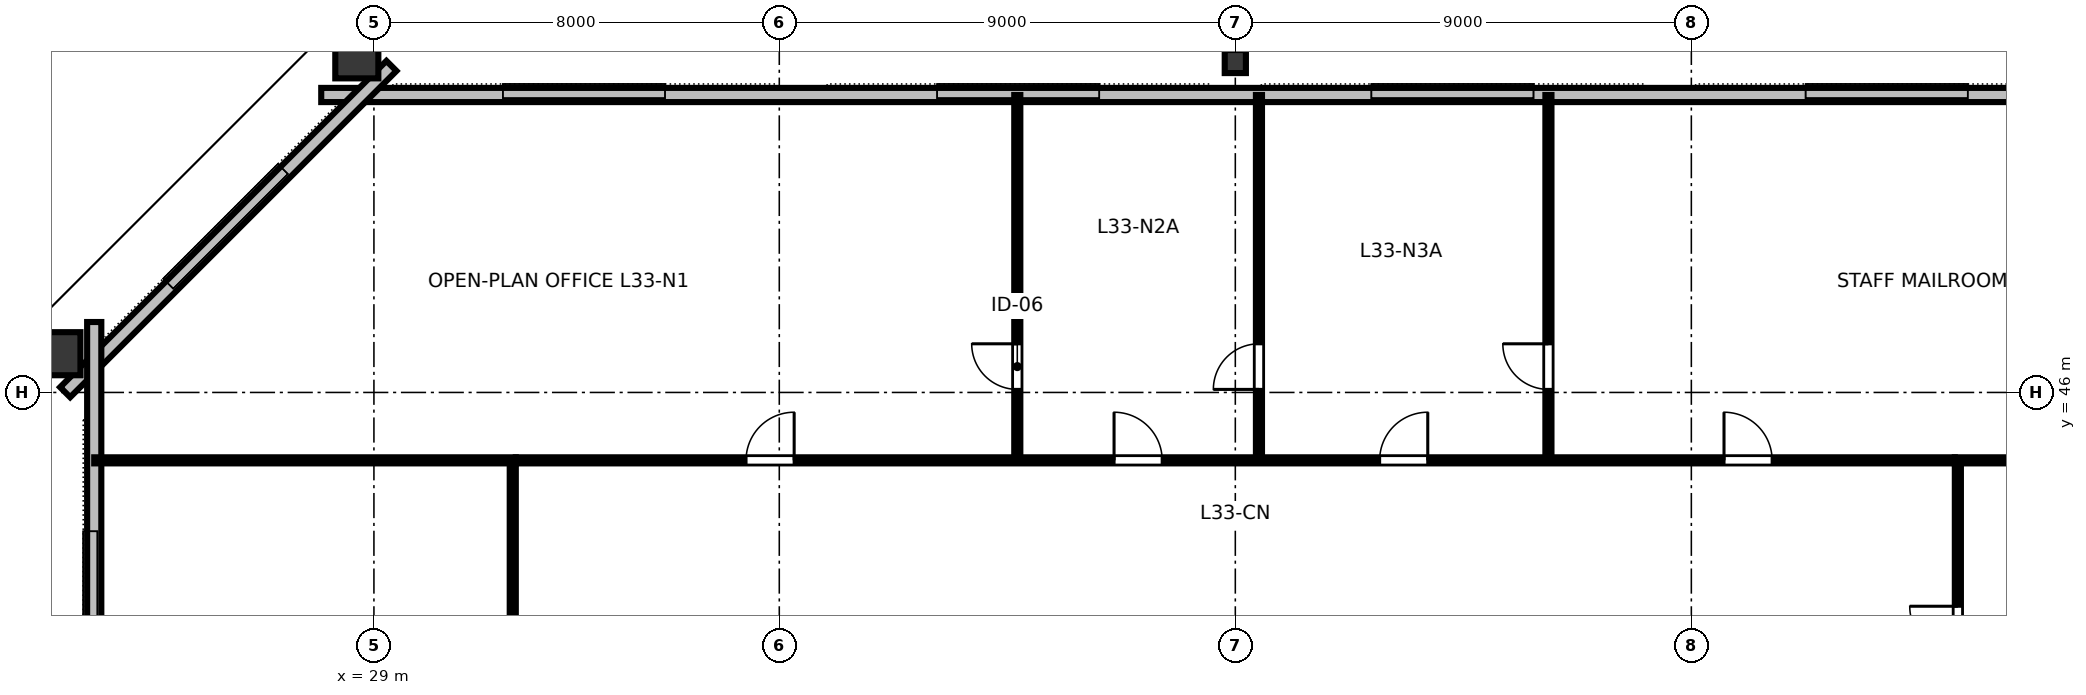
"""IFC4 building model, lengths in metres.
Left out: names, types, materials, properties, quantities, classifications, styles, units other than length and angle.
Written with IfcOpenShell. Run it as: python <this file> out.ifc"""

import sys

from ifc_helpers import new_model, si_unit, direction, frame, frame_2d, origin, origin_2d, place, context, subcontext, project, spatial, rectangle, hollow_rectangle, i_section, extrude, element, fill, save


model = new_model("IFC4")
c1 = context("Model", 3, precision=1e-05, world=origin(), true_north=direction((0.0, 1.0)))
c2 = subcontext(c1, "Body", "Model", "MODEL_VIEW")
j1 = project(units=[si_unit("LENGTHUNIT", "METRE"), si_unit("PLANEANGLEUNIT", "RADIAN")], contexts=[c1])
p1 = place(None, origin())
s1 = spatial("IfcSite", under=j1, at=p1, CompositionType="ELEMENT")
p2 = place(p1, origin())
s2 = spatial("IfcBuilding", under=s1, at=p2, CompositionType="ELEMENT")
p3 = place(p2, frame((0.0, 0.0, 127.6)))
s3 = spatial("IfcBuildingStorey", under=s2, at=p3, CompositionType="ELEMENT", Elevation=127.6)
p4 = place(p3, frame((46.0, 52.53, 0.0), z_axis=(0.0, 0.0, 1.0), x_axis=(1.0, 0.0, 0.0)))
e1 = element("IfcColumn", 1, at=p4, inside=s3, PredefinedType="COLUMN", context=c2, shape_type="SweptSolid", body=[
    extrude(i_section(OverallWidth=0.418, OverallDepth=0.455, WebThickness=0.042, FlangeThickness=0.068, FilletRadius=0.025, at=origin_2d()), origin(), (0.0, 0.0, 1.0), 3.358),
])
for number, where, z_axis, x_axis in (
    (2, (28.662, 52.698, 0.0), (0.0, 0.0, 1.0), (1.0, 0.0, 0.0)),
    (3, (22.708, 46.764, 0.0), (0.0, 0.0, 1.0), (0.0, 1.0, 0.0)),
):
    element("IfcColumn", number, at=place(p3, frame(where, z_axis=z_axis, x_axis=x_axis)), inside=s3, PredefinedType="COLUMN", context=c2, shape_type="SweptSolid", body=[
        extrude(hollow_rectangle(XDim=0.85, YDim=1.0, WallThickness=0.05, at=origin_2d()), origin(), (0.0, 0.0, 1.0), 3.358),
    ])
p5 = place(p3, frame((64.04, 51.87, 0.0), z_axis=(0.0, 0.0, 1.0), x_axis=(-1.0, 0.0, 0.0)))
e4 = element("IfcWall", 4, at=p5, inside=s3, PredefinedType="STANDARD", context=c2, shape_type="SweptSolid", body=[
    extrude(rectangle(XDim=36.08, YDim=0.28, at=frame_2d((18.04, 0.0))), origin(), (0.0, 0.0, 1.0), 3.36),
])
p6 = place(p3, frame((29.345, 52.444, 0.0), z_axis=(0.0, 0.0, 1.0), x_axis=(-0.707106781187, -0.707106781187, 0.0)))
e5 = element("IfcWall", 5, at=p6, inside=s3, PredefinedType="STANDARD", context=c2, shape_type="SweptSolid", body=[
    extrude(rectangle(XDim=9.107, YDim=0.28, at=frame_2d((4.553, 0.0))), origin(), (0.0, 0.0, 1.0), 3.36),
])
p7 = place(p3, frame((23.48, 47.39, 0.0), z_axis=(0.0, 0.0, 1.0), x_axis=(0.0, -1.0, 0.0)))
e6 = element("IfcWall", 6, at=p7, inside=s3, PredefinedType="STANDARD", context=c2, shape_type="SweptSolid", body=[
    extrude(rectangle(XDim=30.78, YDim=0.28, at=frame_2d((15.39, 0.0))), origin(), (0.0, 0.0, 1.0), 3.36),
])
p8 = place(p3, frame((41.697, 44.66, 0.0), z_axis=(0.0, 0.0, 1.0), x_axis=(0.0, 1.0, 0.0)))
e7 = element("IfcWall", 7, at=p8, inside=s3, PredefinedType="PARTITIONING", context=c2, shape_type="SweptSolid", body=[
    extrude(rectangle(XDim=7.21, YDim=0.12, at=frame_2d((3.605, 0.0))), origin(), (0.0, 0.0, 1.0), 2.64),
])
p9 = place(p8, frame((1.4, 0.0, 0.0)))
e8 = element("IfcOpeningElement", 8, at=p9, cuts=e7, PredefinedType="OPENING", context=c2, shape_type="SweptSolid", body=[
    extrude(rectangle(XDim=0.9, YDim=2.15, at=frame_2d((0.45, 1.075))), frame((0.0, 0.07, 0.0), z_axis=(0.0, -1.0, 0.0), x_axis=(1.0, 0.0, 0.0)), (0.0, 0.0, 1.0), 0.14),
])
p10 = place(p3, frame((46.467, 44.66, 0.0), z_axis=(0.0, 0.0, 1.0), x_axis=(0.0, 1.0, 0.0)))
e9 = element("IfcWall", 9, at=p10, inside=s3, PredefinedType="PARTITIONING", context=c2, shape_type="SweptSolid", body=[
    extrude(rectangle(XDim=7.21, YDim=0.12, at=frame_2d((3.605, 0.0))), origin(), (0.0, 0.0, 1.0), 2.64),
])
p11 = place(p10, frame((1.4, 0.0, 0.0)))
e10 = element("IfcOpeningElement", 10, at=p11, cuts=e9, PredefinedType="OPENING", context=c2, shape_type="SweptSolid", body=[
    extrude(rectangle(XDim=0.9, YDim=2.15, at=frame_2d((0.45, 1.075))), frame((0.0, 0.07, 0.0), z_axis=(0.0, -1.0, 0.0), x_axis=(1.0, 0.0, 0.0)), (0.0, 0.0, 1.0), 0.14),
])
p12 = place(p3, frame((52.179, 44.66, 0.0), z_axis=(0.0, 0.0, 1.0), x_axis=(0.0, 1.0, 0.0)))
e11 = element("IfcWall", 11, at=p12, inside=s3, PredefinedType="PARTITIONING", context=c2, shape_type="SweptSolid", body=[
    extrude(rectangle(XDim=7.21, YDim=0.12, at=frame_2d((3.605, 0.0))), origin(), (0.0, 0.0, 1.0), 2.64),
])
p13 = place(p12, frame((1.4, 0.0, 0.0)))
e12 = element("IfcOpeningElement", 12, at=p13, cuts=e11, PredefinedType="OPENING", context=c2, shape_type="SweptSolid", body=[
    extrude(rectangle(XDim=0.9, YDim=2.15, at=frame_2d((0.45, 1.075))), frame((0.0, 0.07, 0.0), z_axis=(0.0, -1.0, 0.0), x_axis=(1.0, 0.0, 0.0)), (0.0, 0.0, 1.0), 0.14),
])
p14 = place(p3, frame((31.8, 44.66, 0.0), z_axis=(0.0, 0.0, 1.0), x_axis=(1.0, 0.0, 0.0)))
e13 = element("IfcWall", 13, at=p14, inside=s3, PredefinedType="PARTITIONING", context=c2, shape_type="SweptSolid", body=[
    extrude(rectangle(XDim=28.4, YDim=0.12, at=frame_2d((14.2, 0.0))), origin(), (0.0, 0.0, 1.0), 2.64),
])
p15 = place(p14, frame((4.544, 0.0, 0.0)))
e14 = element("IfcOpeningElement", 14, at=p15, cuts=e13, PredefinedType="OPENING", context=c2, shape_type="SweptSolid", body=[
    extrude(rectangle(XDim=0.95, YDim=2.15, at=frame_2d((0.475, 1.075))), frame((0.0, 0.07, 0.0), z_axis=(0.0, -1.0, 0.0), x_axis=(1.0, 0.0, 0.0)), (0.0, 0.0, 1.0), 0.14),
])
p16 = place(p14, frame((11.807, 0.0, 0.0)))
e15 = element("IfcOpeningElement", 15, at=p16, cuts=e13, PredefinedType="OPENING", context=c2, shape_type="SweptSolid", body=[
    extrude(rectangle(XDim=0.95, YDim=2.15, at=frame_2d((0.475, 1.075))), frame((0.0, 0.07, 0.0), z_axis=(0.0, -1.0, 0.0), x_axis=(1.0, 0.0, 0.0)), (0.0, 0.0, 1.0), 0.14),
])
p17 = place(p14, frame((17.048, 0.0, 0.0)))
e16 = element("IfcOpeningElement", 16, at=p17, cuts=e13, PredefinedType="OPENING", context=c2, shape_type="SweptSolid", body=[
    extrude(rectangle(XDim=0.95, YDim=2.15, at=frame_2d((0.475, 1.075))), frame((0.0, 0.07, 0.0), z_axis=(0.0, -1.0, 0.0), x_axis=(1.0, 0.0, 0.0)), (0.0, 0.0, 1.0), 0.14),
])
p18 = place(p14, frame((23.845, 0.0, 0.0)))
e17 = element("IfcOpeningElement", 17, at=p18, cuts=e13, PredefinedType="OPENING", context=c2, shape_type="SweptSolid", body=[
    extrude(rectangle(XDim=0.95, YDim=2.15, at=frame_2d((0.475, 1.075))), frame((0.0, 0.07, 0.0), z_axis=(0.0, -1.0, 0.0), x_axis=(1.0, 0.0, 0.0)), (0.0, 0.0, 1.0), 0.14),
])
p19 = place(p3, frame((31.74, 33.02, 0.0), z_axis=(0.0, 0.0, 1.0), x_axis=(0.0, 1.0, 0.0)))
e18 = element("IfcWall", 18, at=p19, inside=s3, PredefinedType="PARTITIONING", context=c2, shape_type="SweptSolid", body=[
    extrude(rectangle(XDim=11.58, YDim=0.12, at=frame_2d((5.79, 0.0))), origin(), (0.0, 0.0, 1.0), 2.64),
])
p20 = place(p19, frame((5.215, 0.0, 0.0)))
e19 = element("IfcOpeningElement", 19, at=p20, cuts=e18, PredefinedType="OPENING", context=c2, shape_type="SweptSolid", body=[
    extrude(rectangle(XDim=0.95, YDim=2.15, at=frame_2d((0.475, 1.075))), frame((0.0, 0.07, 0.0), z_axis=(0.0, -1.0, 0.0), x_axis=(1.0, 0.0, 0.0)), (0.0, 0.0, 1.0), 0.14),
])
p21 = place(p3, frame((60.26, 33.02, 0.0), z_axis=(0.0, 0.0, 1.0), x_axis=(0.0, 1.0, 0.0)))
e20 = element("IfcWall", 20, at=p21, inside=s3, PredefinedType="PARTITIONING", context=c2, shape_type="SweptSolid", body=[
    extrude(rectangle(XDim=11.58, YDim=0.12, at=frame_2d((5.79, 0.0))), origin(), (0.0, 0.0, 1.0), 2.64),
])
p22 = place(p21, frame((2.121, 0.0, 0.0)))
e21 = element("IfcOpeningElement", 21, at=p22, cuts=e20, PredefinedType="OPENING", context=c2, shape_type="SweptSolid", body=[
    extrude(rectangle(XDim=0.95, YDim=2.15, at=frame_2d((0.475, 1.075))), frame((0.0, 0.07, 0.0), z_axis=(0.0, -1.0, 0.0), x_axis=(1.0, 0.0, 0.0)), (0.0, 0.0, 1.0), 0.14),
])
p23 = place(p21, frame((7.811, 0.0, 0.0)))
e22 = element("IfcOpeningElement", 22, at=p23, cuts=e20, PredefinedType="OPENING", context=c2, shape_type="SweptSolid", body=[
    extrude(rectangle(XDim=0.95, YDim=2.15, at=frame_2d((0.475, 1.075))), frame((0.0, 0.07, 0.0), z_axis=(0.0, -1.0, 0.0), x_axis=(1.0, 0.0, 0.0)), (0.0, 0.0, 1.0), 0.14),
])
for number, where, z_axis, x_axis in (
    (23, (31.8, 44.66, 0.0), (0.0, 0.0, 1.0), (-1.0, 0.0, 0.0)),
    (24, (60.2, 44.66, 0.0), (0.0, 0.0, 1.0), (1.0, 0.0, 0.0)),
):
    element("IfcWall", number, at=place(p3, frame(where, z_axis=z_axis, x_axis=x_axis)), inside=s3, PredefinedType="PARTITIONING", context=c2, shape_type="SweptSolid", body=[
        extrude(rectangle(XDim=8.32, YDim=0.12, at=frame_2d((4.16, 0.0))), origin(), (0.0, 0.0, 1.0), 2.64),
    ])
p24 = place(p9, origin())
e25 = element("IfcDoor", 25, at=p24, inside=s3, OperationType="SINGLE_SWING_RIGHT", PredefinedType="DOOR", context=c2, shape_type="SweptSolid", body=[
    extrude(rectangle(XDim=0.9, YDim=2.15, at=frame_2d((0.45, 1.075))), frame((0.0, 0.025, 0.0), z_axis=(0.0, -1.0, 0.0), x_axis=(1.0, 0.0, 0.0)), (0.0, 0.0, 1.0), 0.05),
])
fill(e8, e25)
p25 = place(p11, origin())
e26 = element("IfcDoor", 26, at=p25, inside=s3, OperationType="SINGLE_SWING_LEFT", PredefinedType="DOOR", context=c2, shape_type="SweptSolid", body=[
    extrude(rectangle(XDim=0.9, YDim=2.15, at=frame_2d((0.45, 1.075))), frame((0.0, 0.025, 0.0), z_axis=(0.0, -1.0, 0.0), x_axis=(1.0, 0.0, 0.0)), (0.0, 0.0, 1.0), 0.05),
])
fill(e10, e26)
p26 = place(p13, origin())
e27 = element("IfcDoor", 27, at=p26, inside=s3, OperationType="SINGLE_SWING_RIGHT", PredefinedType="DOOR", context=c2, shape_type="SweptSolid", body=[
    extrude(rectangle(XDim=0.9, YDim=2.15, at=frame_2d((0.45, 1.075))), frame((0.0, 0.025, 0.0), z_axis=(0.0, -1.0, 0.0), x_axis=(1.0, 0.0, 0.0)), (0.0, 0.0, 1.0), 0.05),
])
fill(e12, e27)
p27 = place(p15, origin())
e28 = element("IfcDoor", 28, at=p27, inside=s3, OperationType="SINGLE_SWING_RIGHT", PredefinedType="DOOR", context=c2, shape_type="SweptSolid", body=[
    extrude(rectangle(XDim=0.95, YDim=2.15, at=frame_2d((0.475, 1.075))), frame((0.0, 0.025, 0.0), z_axis=(0.0, -1.0, 0.0), x_axis=(1.0, 0.0, 0.0)), (0.0, 0.0, 1.0), 0.05),
])
fill(e14, e28)
p28 = place(p16, origin())
e29 = element("IfcDoor", 29, at=p28, inside=s3, OperationType="SINGLE_SWING_LEFT", PredefinedType="DOOR", context=c2, shape_type="SweptSolid", body=[
    extrude(rectangle(XDim=0.95, YDim=2.15, at=frame_2d((0.475, 1.075))), frame((0.0, 0.025, 0.0), z_axis=(0.0, -1.0, 0.0), x_axis=(1.0, 0.0, 0.0)), (0.0, 0.0, 1.0), 0.05),
])
fill(e15, e29)
p29 = place(p17, origin())
e30 = element("IfcDoor", 30, at=p29, inside=s3, OperationType="SINGLE_SWING_RIGHT", PredefinedType="DOOR", context=c2, shape_type="SweptSolid", body=[
    extrude(rectangle(XDim=0.95, YDim=2.15, at=frame_2d((0.475, 1.075))), frame((0.0, 0.025, 0.0), z_axis=(0.0, -1.0, 0.0), x_axis=(1.0, 0.0, 0.0)), (0.0, 0.0, 1.0), 0.05),
])
fill(e16, e30)
p30 = place(p18, origin())
e31 = element("IfcDoor", 31, at=p30, inside=s3, OperationType="SINGLE_SWING_LEFT", PredefinedType="DOOR", context=c2, shape_type="SweptSolid", body=[
    extrude(rectangle(XDim=0.95, YDim=2.15, at=frame_2d((0.475, 1.075))), frame((0.0, 0.025, 0.0), z_axis=(0.0, -1.0, 0.0), x_axis=(1.0, 0.0, 0.0)), (0.0, 0.0, 1.0), 0.05),
])
fill(e17, e31)
p31 = place(p23, origin())
e32 = element("IfcDoor", 32, at=p31, inside=s3, OperationType="SINGLE_SWING_RIGHT", PredefinedType="DOOR", context=c2, shape_type="SweptSolid", body=[
    extrude(rectangle(XDim=0.95, YDim=2.15, at=frame_2d((0.475, 1.075))), frame((0.0, 0.025, 0.0), z_axis=(0.0, -1.0, 0.0), x_axis=(1.0, 0.0, 0.0)), (0.0, 0.0, 1.0), 0.05),
])
fill(e22, e32)
save(model, sys.argv[1])
